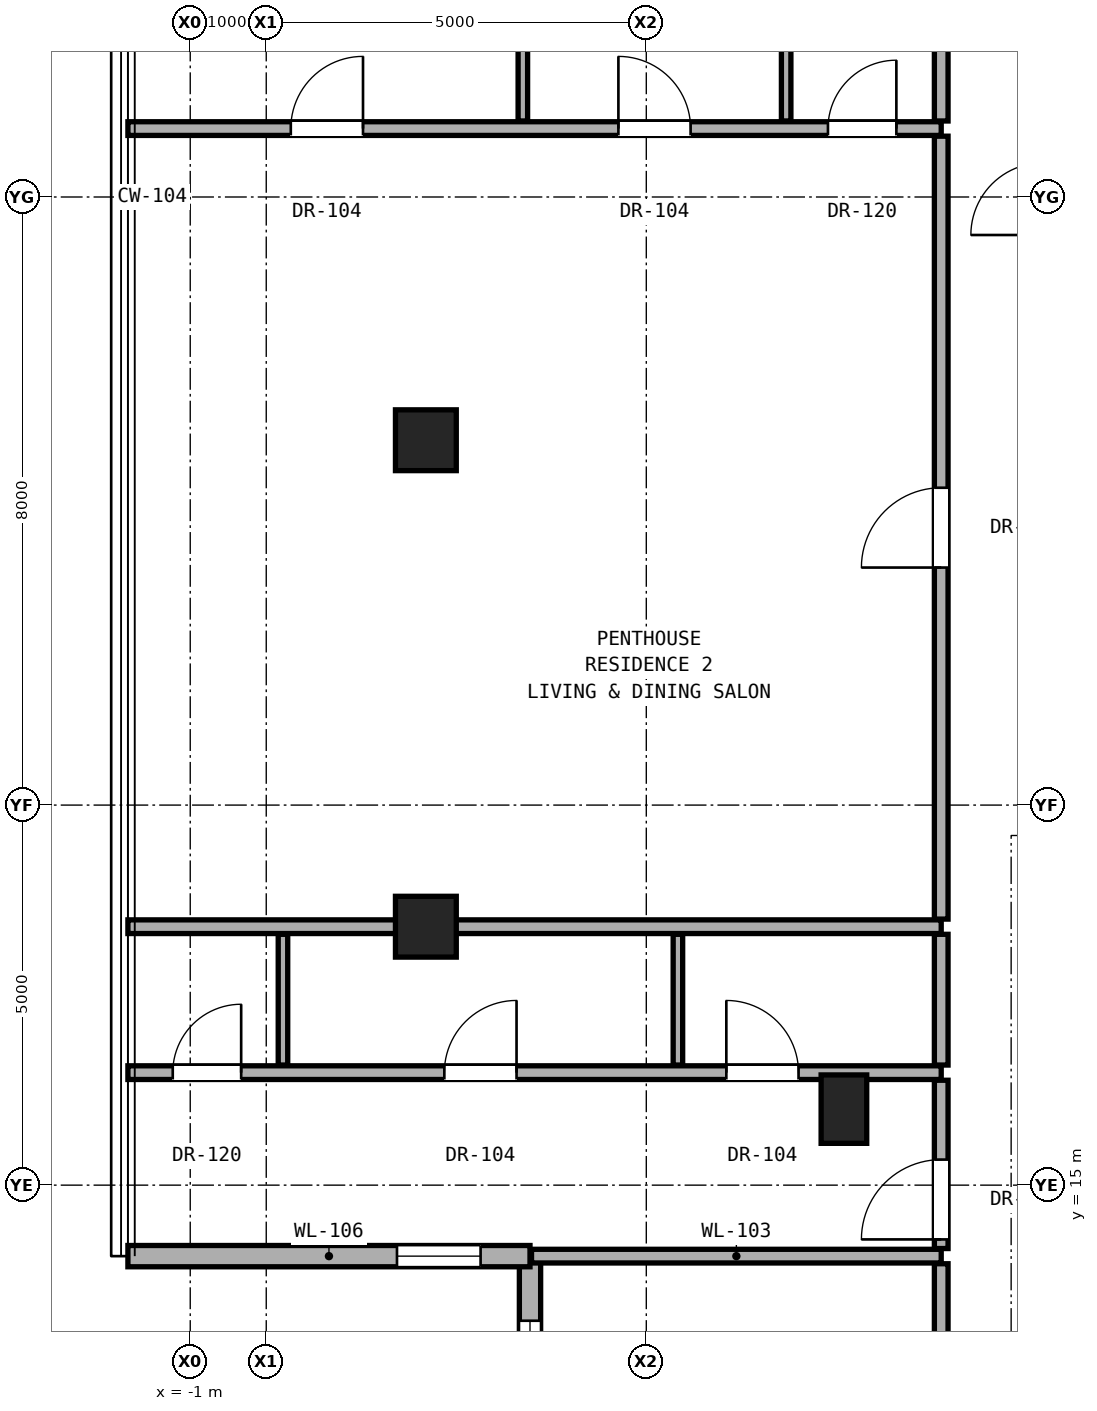
"""IFC4 building model, lengths in metres.
Left out: names, types, materials, properties, quantities, classifications, styles, units other than length and angle.
Written with IfcOpenShell. Run it as: python <this file> out.ifc"""

import sys

from ifc_helpers import new_model, si_unit, direction, frame, frame_2d, origin, origin_2d, place, context, subcontext, project, spatial, rectangle, hollow_rectangle, extrude, element, fill, save


model = new_model("IFC4")
c1 = context("Model", 3, precision=1e-05, world=origin(), true_north=direction((0.0, 1.0)))
c2 = subcontext(c1, "Body", "Model", "MODEL_VIEW")
j1 = project(units=[si_unit("LENGTHUNIT", "METRE"), si_unit("PLANEANGLEUNIT", "RADIAN")], contexts=[c1])
p1 = place(None, origin())
s1 = spatial("IfcSite", under=j1, at=p1, CompositionType="ELEMENT")
p2 = place(p1, origin())
s2 = spatial("IfcBuilding", under=s1, at=p2, CompositionType="ELEMENT")
p3 = place(p2, frame((0.0, 0.0, 245.8)))
s3 = spatial("IfcBuildingStorey", under=s2, at=p3, CompositionType="ELEMENT", Elevation=245.8)
for number, where, z_axis, x_axis in (
    (1, (2.1, 18.4, 0.0), (0.0, 0.0, 1.0), (1.0, 0.0, 0.0)),
    (2, (2.1, 24.8, 0.0), (0.0, 0.0, 1.0), (1.0, 0.0, 0.0)),
):
    element("IfcColumn", number, at=place(p3, frame(where, z_axis=z_axis, x_axis=x_axis)), inside=s3, PredefinedType="COLUMN", context=c2, shape_type="SweptSolid", body=[
        extrude(hollow_rectangle(XDim=0.8, YDim=0.8, WallThickness=0.045, at=origin_2d()), origin(), (0.0, 0.0, 1.0), 3.3),
    ])
p4 = place(p3, frame((7.6, 16.0, 0.0), z_axis=(0.0, 0.0, 1.0), x_axis=(1.0, 0.0, 0.0)))
e3 = element("IfcColumn", 3, at=p4, inside=s3, PredefinedType="PILASTER", context=c2, shape_type="SweptSolid", body=[
    extrude(rectangle(XDim=0.6, YDim=0.9, at=origin_2d()), origin(), (0.0, 0.0, 1.0), 3.3),
])
p5 = place(p3, frame((3.47, 14.066, 0.0), z_axis=(0.0, 0.0, 1.0), x_axis=(0.0, -1.0, 0.0)))
e4 = element("IfcWall", 4, at=p5, inside=s3, PredefinedType="SOLIDWALL", context=c2, shape_type="SweptSolid", body=[
    extrude(rectangle(XDim=5.29, YDim=0.28, at=frame_2d((2.645, 0.0))), origin(), (0.0, 0.0, 1.0), 3.08),
])
p6 = place(p5, frame((0.85, 0.0, 0.73)))
e5 = element("IfcOpeningElement", 5, at=p6, cuts=e4, PredefinedType="OPENING", context=c2, shape_type="SweptSolid", body=[
    extrude(rectangle(XDim=1.35, YDim=2.2, at=frame_2d((0.675, 1.1))), frame((0.0, 0.15, 0.0), z_axis=(0.0, -1.0, 0.0), x_axis=(1.0, 0.0, 0.0)), (0.0, 0.0, 1.0), 0.3),
])
p7 = place(p3, frame((-1.82, 14.066, 0.0), z_axis=(0.0, 0.0, 1.0), x_axis=(1.0, 0.0, 0.0)))
e6 = element("IfcWall", 6, at=p7, inside=s3, PredefinedType="SOLIDWALL", context=c2, shape_type="SweptSolid", body=[
    extrude(rectangle(XDim=5.29, YDim=0.28, at=frame_2d((2.645, 0.0))), origin(), (0.0, 0.0, 1.0), 3.08),
])
p8 = place(p7, frame((3.54, 0.0, 0.85)))
e7 = element("IfcOpeningElement", 7, at=p8, cuts=e6, PredefinedType="OPENING", context=c2, shape_type="SweptSolid", body=[
    extrude(rectangle(XDim=1.1, YDim=2.0, at=frame_2d((0.55, 1.0))), frame((0.0, 0.15, 0.0), z_axis=(0.0, -1.0, 0.0), x_axis=(1.0, 0.0, 0.0)), (0.0, 0.0, 1.0), 0.3),
])
p9 = place(p3, frame((3.49, 14.066, 0.0), z_axis=(0.0, 0.0, 1.0), x_axis=(1.0, 0.0, 0.0)))
e8 = element("IfcWall", 8, at=p9, inside=s3, PredefinedType="PARTITIONING", context=c2, shape_type="SweptSolid", body=[
    extrude(rectangle(XDim=5.39, YDim=0.18, at=frame_2d((2.695, 0.0))), origin(), (0.0, 0.0, 1.0), 3.1),
])
p10 = place(p3, frame((-1.82, 16.48, 0.0), z_axis=(0.0, 0.0, 1.0), x_axis=(1.0, 0.0, 0.0)))
e9 = element("IfcWall", 9, at=p10, inside=s3, PredefinedType="PARTITIONING", context=c2, shape_type="SweptSolid", body=[
    extrude(rectangle(XDim=10.7, YDim=0.18, at=frame_2d((5.35, 0.0))), origin(), (0.0, 0.0, 1.0), 2.543),
])
p11 = place(p10, frame((4.163, 0.0, 0.0)))
e10 = element("IfcOpeningElement", 10, at=p11, cuts=e9, PredefinedType="OPENING", context=c2, shape_type="SweptSolid", body=[
    extrude(rectangle(XDim=0.95, YDim=2.15, at=frame_2d((0.475, 1.075))), frame((0.0, 0.1, 0.0), z_axis=(0.0, -1.0, 0.0), x_axis=(1.0, 0.0, 0.0)), (0.0, 0.0, 1.0), 0.2),
])
p12 = place(p10, frame((7.873, 0.0, 0.0)))
e11 = element("IfcOpeningElement", 11, at=p12, cuts=e9, PredefinedType="OPENING", context=c2, shape_type="SweptSolid", body=[
    extrude(rectangle(XDim=0.95, YDim=2.15, at=frame_2d((0.475, 1.075))), frame((0.0, 0.1, 0.0), z_axis=(0.0, -1.0, 0.0), x_axis=(1.0, 0.0, 0.0)), (0.0, 0.0, 1.0), 0.2),
])
p13 = place(p10, frame((0.59, 0.0, 0.0)))
e12 = element("IfcOpeningElement", 12, at=p13, cuts=e9, PredefinedType="OPENING", context=c2, shape_type="SweptSolid", body=[
    extrude(rectangle(XDim=0.9, YDim=2.1, at=frame_2d((0.45, 1.05))), frame((0.0, 0.1, 0.0), z_axis=(0.0, -1.0, 0.0), x_axis=(1.0, 0.0, 0.0)), (0.0, 0.0, 1.0), 0.2),
])
p14 = place(p3, frame((-1.82, 18.4, 0.0), z_axis=(0.0, 0.0, 1.0), x_axis=(1.0, 0.0, 0.0)))
e13 = element("IfcWall", 13, at=p14, inside=s3, PredefinedType="PARTITIONING", context=c2, shape_type="SweptSolid", body=[
    extrude(rectangle(XDim=10.7, YDim=0.18, at=frame_2d((5.35, 0.0))), origin(), (0.0, 0.0, 1.0), 2.319),
])
p15 = place(p3, frame((-1.82, 28.9, 0.0), z_axis=(0.0, 0.0, 1.0), x_axis=(1.0, 0.0, 0.0)))
e14 = element("IfcWall", 14, at=p15, inside=s3, PredefinedType="PARTITIONING", context=c2, shape_type="SweptSolid", body=[
    extrude(rectangle(XDim=10.7, YDim=0.18, at=frame_2d((5.35, 0.0))), origin(), (0.0, 0.0, 1.0), 2.319),
])
p16 = place(p15, frame((2.143, 0.0, 0.0)))
e15 = element("IfcOpeningElement", 15, at=p16, cuts=e14, PredefinedType="OPENING", context=c2, shape_type="SweptSolid", body=[
    extrude(rectangle(XDim=0.95, YDim=2.15, at=frame_2d((0.475, 1.075))), frame((0.0, 0.1, 0.0), z_axis=(0.0, -1.0, 0.0), x_axis=(1.0, 0.0, 0.0)), (0.0, 0.0, 1.0), 0.2),
])
p17 = place(p15, frame((6.453, 0.0, 0.0)))
e16 = element("IfcOpeningElement", 16, at=p17, cuts=e14, PredefinedType="OPENING", context=c2, shape_type="SweptSolid", body=[
    extrude(rectangle(XDim=0.95, YDim=2.15, at=frame_2d((0.475, 1.075))), frame((0.0, 0.1, 0.0), z_axis=(0.0, -1.0, 0.0), x_axis=(1.0, 0.0, 0.0)), (0.0, 0.0, 1.0), 0.2),
])
p18 = place(p15, frame((9.21, 0.0, 0.0)))
e17 = element("IfcOpeningElement", 17, at=p18, cuts=e14, PredefinedType="OPENING", context=c2, shape_type="SweptSolid", body=[
    extrude(rectangle(XDim=0.9, YDim=2.1, at=frame_2d((0.45, 1.05))), frame((0.0, 0.1, 0.0), z_axis=(0.0, -1.0, 0.0), x_axis=(1.0, 0.0, 0.0)), (0.0, 0.0, 1.0), 0.2),
])
p19 = place(p3, frame((0.22, 16.58, 0.0), z_axis=(0.0, 0.0, 1.0), x_axis=(0.0, 1.0, 0.0)))
e18 = element("IfcWall", 18, at=p19, inside=s3, PredefinedType="PARTITIONING", context=c2, shape_type="SweptSolid", body=[
    extrude(rectangle(XDim=1.72, YDim=0.125, at=frame_2d((0.86, 0.0))), origin(), (0.0, 0.0, 1.0), 3.1),
])
p20 = place(p3, frame((3.376, 29.0, 0.0), z_axis=(0.0, 0.0, 1.0), x_axis=(0.0, 1.0, 0.0)))
e19 = element("IfcWall", 19, at=p20, inside=s3, PredefinedType="PARTITIONING", context=c2, shape_type="SweptSolid", body=[
    extrude(rectangle(XDim=2.1, YDim=0.125, at=frame_2d((1.05, 0.0))), origin(), (0.0, 0.0, 1.0), 2.396),
])
p21 = place(p3, frame((5.416, 16.58, 0.0), z_axis=(0.0, 0.0, 1.0), x_axis=(0.0, 1.0, 0.0)))
e20 = element("IfcWall", 20, at=p21, inside=s3, PredefinedType="PARTITIONING", context=c2, shape_type="SweptSolid", body=[
    extrude(rectangle(XDim=1.72, YDim=0.125, at=frame_2d((0.86, 0.0))), origin(), (0.0, 0.0, 1.0), 2.492),
])
p22 = place(p3, frame((6.84, 29.0, 0.0), z_axis=(0.0, 0.0, 1.0), x_axis=(0.0, 1.0, 0.0)))
e21 = element("IfcWall", 21, at=p22, inside=s3, PredefinedType="PARTITIONING", context=c2, shape_type="SweptSolid", body=[
    extrude(rectangle(XDim=2.1, YDim=0.125, at=frame_2d((1.05, 0.0))), origin(), (0.0, 0.0, 1.0), 2.396),
])
p23 = place(p3, frame((8.88, 8.776, 0.0), z_axis=(0.0, 0.0, 1.0), x_axis=(0.0, 1.0, 0.0)))
e22 = element("IfcWall", 22, at=p23, inside=s3, PredefinedType="PARTITIONING", context=c2, shape_type="SweptSolid", body=[
    extrude(rectangle(XDim=5.19, YDim=0.18, at=frame_2d((2.595, 0.0))), origin(), (0.0, 0.0, 1.0), 3.1),
])
p24 = place(p23, frame((2.12, 0.0, 0.0)))
e23 = element("IfcOpeningElement", 23, at=p24, cuts=e22, PredefinedType="OPENING", context=c2, shape_type="SweptSolid", body=[
    extrude(rectangle(XDim=0.95, YDim=2.15, at=frame_2d((0.475, 1.075))), frame((0.0, 0.1, 0.0), z_axis=(0.0, -1.0, 0.0), x_axis=(1.0, 0.0, 0.0)), (0.0, 0.0, 1.0), 0.2),
])
p25 = place(p3, frame((8.88, 14.166, 0.0), z_axis=(0.0, 0.0, 1.0), x_axis=(0.0, 1.0, 0.0)))
e24 = element("IfcWall", 24, at=p25, inside=s3, PredefinedType="PARTITIONING", context=c2, shape_type="SweptSolid", body=[
    extrude(rectangle(XDim=2.214, YDim=0.18, at=frame_2d((1.107, 0.0))), origin(), (0.0, 0.0, 1.0), 3.1),
])
p26 = place(p25, frame((0.12, 0.0, 0.0)))
e25 = element("IfcOpeningElement", 25, at=p26, cuts=e24, PredefinedType="OPENING", context=c2, shape_type="SweptSolid", body=[
    extrude(rectangle(XDim=1.05, YDim=2.2, at=frame_2d((0.525, 1.1))), frame((0.0, 0.1, 0.0), z_axis=(0.0, -1.0, 0.0), x_axis=(1.0, 0.0, 0.0)), (0.0, 0.0, 1.0), 0.2),
])
p27 = place(p3, frame((8.88, 16.58, 0.0), z_axis=(0.0, 0.0, 1.0), x_axis=(0.0, 1.0, 0.0)))
e26 = element("IfcWall", 26, at=p27, inside=s3, PredefinedType="PARTITIONING", context=c2, shape_type="SweptSolid", body=[
    extrude(rectangle(XDim=1.72, YDim=0.18, at=frame_2d((0.86, 0.0))), origin(), (0.0, 0.0, 1.0), 2.492),
])
p28 = place(p3, frame((8.88, 18.5, 0.0), z_axis=(0.0, 0.0, 1.0), x_axis=(0.0, 1.0, 0.0)))
e27 = element("IfcWall", 27, at=p28, inside=s3, PredefinedType="PARTITIONING", context=c2, shape_type="SweptSolid", body=[
    extrude(rectangle(XDim=10.3, YDim=0.18, at=frame_2d((5.15, 0.0))), origin(), (0.0, 0.0, 1.0), 2.396),
])
p29 = place(p28, frame((4.625, 0.0, 0.0)))
e28 = element("IfcOpeningElement", 28, at=p29, cuts=e27, PredefinedType="OPENING", context=c2, shape_type="SweptSolid", body=[
    extrude(rectangle(XDim=1.05, YDim=2.2, at=frame_2d((0.525, 1.1))), frame((0.0, 0.1, 0.0), z_axis=(0.0, -1.0, 0.0), x_axis=(1.0, 0.0, 0.0)), (0.0, 0.0, 1.0), 0.2),
])
p30 = place(p3, frame((8.88, 29.0, 0.0), z_axis=(0.0, 0.0, 1.0), x_axis=(0.0, 1.0, 0.0)))
e29 = element("IfcWall", 29, at=p30, inside=s3, PredefinedType="PARTITIONING", context=c2, shape_type="SweptSolid", body=[
    extrude(rectangle(XDim=2.1, YDim=0.18, at=frame_2d((1.05, 0.0))), origin(), (0.0, 0.0, 1.0), 2.396),
])
p31 = place(p6, origin())
e30 = element("IfcWindow", 30, at=p31, inside=s3, PartitioningType="SINGLE_PANEL", PredefinedType="WINDOW", context=c2, shape_type="SweptSolid", body=[
    extrude(rectangle(XDim=1.35, YDim=2.2, at=frame_2d((0.675, 1.1))), frame((0.0, 0.03, 0.0), z_axis=(0.0, -1.0, 0.0), x_axis=(1.0, 0.0, 0.0)), (0.0, 0.0, 1.0), 0.06),
])
fill(e5, e30)
p32 = place(p8, origin())
e31 = element("IfcWindow", 31, at=p32, inside=s3, PartitioningType="SINGLE_PANEL", PredefinedType="WINDOW", context=c2, shape_type="SweptSolid", body=[
    extrude(rectangle(XDim=1.1, YDim=2.0, at=frame_2d((0.55, 1.0))), frame((0.0, 0.03, 0.0), z_axis=(0.0, -1.0, 0.0), x_axis=(1.0, 0.0, 0.0)), (0.0, 0.0, 1.0), 0.06),
])
fill(e7, e31)
p33 = place(p26, origin())
e32 = element("IfcDoor", 32, at=p33, inside=s3, OperationType="SINGLE_SWING_LEFT", PredefinedType="DOOR", context=c2, shape_type="SweptSolid", body=[
    extrude(rectangle(XDim=1.05, YDim=2.2, at=frame_2d((0.525, 1.1))), frame((0.0, 0.025, 0.0), z_axis=(0.0, -1.0, 0.0), x_axis=(1.0, 0.0, 0.0)), (0.0, 0.0, 1.0), 0.05),
])
fill(e25, e32)
p34 = place(p11, origin())
e33 = element("IfcDoor", 33, at=p34, inside=s3, OperationType="SINGLE_SWING_RIGHT", PredefinedType="DOOR", context=c2, shape_type="SweptSolid", body=[
    extrude(rectangle(XDim=0.95, YDim=2.15, at=frame_2d((0.475, 1.075))), frame((0.0, 0.025, 0.0), z_axis=(0.0, -1.0, 0.0), x_axis=(1.0, 0.0, 0.0)), (0.0, 0.0, 1.0), 0.05),
])
fill(e10, e33)
p35 = place(p12, origin())
e34 = element("IfcDoor", 34, at=p35, inside=s3, OperationType="SINGLE_SWING_LEFT", PredefinedType="DOOR", context=c2, shape_type="SweptSolid", body=[
    extrude(rectangle(XDim=0.95, YDim=2.15, at=frame_2d((0.475, 1.075))), frame((0.0, 0.025, 0.0), z_axis=(0.0, -1.0, 0.0), x_axis=(1.0, 0.0, 0.0)), (0.0, 0.0, 1.0), 0.05),
])
fill(e11, e34)
p36 = place(p13, origin())
e35 = element("IfcDoor", 35, at=p36, inside=s3, OperationType="SINGLE_SWING_RIGHT", PredefinedType="DOOR", context=c2, shape_type="SweptSolid", body=[
    extrude(rectangle(XDim=0.9, YDim=2.1, at=frame_2d((0.45, 1.05))), frame((0.0, 0.025, 0.0), z_axis=(0.0, -1.0, 0.0), x_axis=(1.0, 0.0, 0.0)), (0.0, 0.0, 1.0), 0.05),
])
fill(e12, e35)
p37 = place(p29, origin())
e36 = element("IfcDoor", 36, at=p37, inside=s3, OperationType="SINGLE_SWING_LEFT", PredefinedType="DOOR", context=c2, shape_type="SweptSolid", body=[
    extrude(rectangle(XDim=1.05, YDim=2.2, at=frame_2d((0.525, 1.1))), frame((0.0, 0.025, 0.0), z_axis=(0.0, -1.0, 0.0), x_axis=(1.0, 0.0, 0.0)), (0.0, 0.0, 1.0), 0.05),
])
fill(e28, e36)
p38 = place(p16, origin())
e37 = element("IfcDoor", 37, at=p38, inside=s3, OperationType="SINGLE_SWING_RIGHT", PredefinedType="DOOR", context=c2, shape_type="SweptSolid", body=[
    extrude(rectangle(XDim=0.95, YDim=2.15, at=frame_2d((0.475, 1.075))), frame((0.0, 0.025, 0.0), z_axis=(0.0, -1.0, 0.0), x_axis=(1.0, 0.0, 0.0)), (0.0, 0.0, 1.0), 0.05),
])
fill(e15, e37)
p39 = place(p17, origin())
e38 = element("IfcDoor", 38, at=p39, inside=s3, OperationType="SINGLE_SWING_LEFT", PredefinedType="DOOR", context=c2, shape_type="SweptSolid", body=[
    extrude(rectangle(XDim=0.95, YDim=2.15, at=frame_2d((0.475, 1.075))), frame((0.0, 0.025, 0.0), z_axis=(0.0, -1.0, 0.0), x_axis=(1.0, 0.0, 0.0)), (0.0, 0.0, 1.0), 0.05),
])
fill(e16, e38)
p40 = place(p18, origin())
e39 = element("IfcDoor", 39, at=p40, inside=s3, OperationType="SINGLE_SWING_RIGHT", PredefinedType="DOOR", context=c2, shape_type="SweptSolid", body=[
    extrude(rectangle(XDim=0.9, YDim=2.1, at=frame_2d((0.45, 1.05))), frame((0.0, 0.025, 0.0), z_axis=(0.0, -1.0, 0.0), x_axis=(1.0, 0.0, 0.0)), (0.0, 0.0, 1.0), 0.05),
])
fill(e17, e39)
save(model, sys.argv[1])
